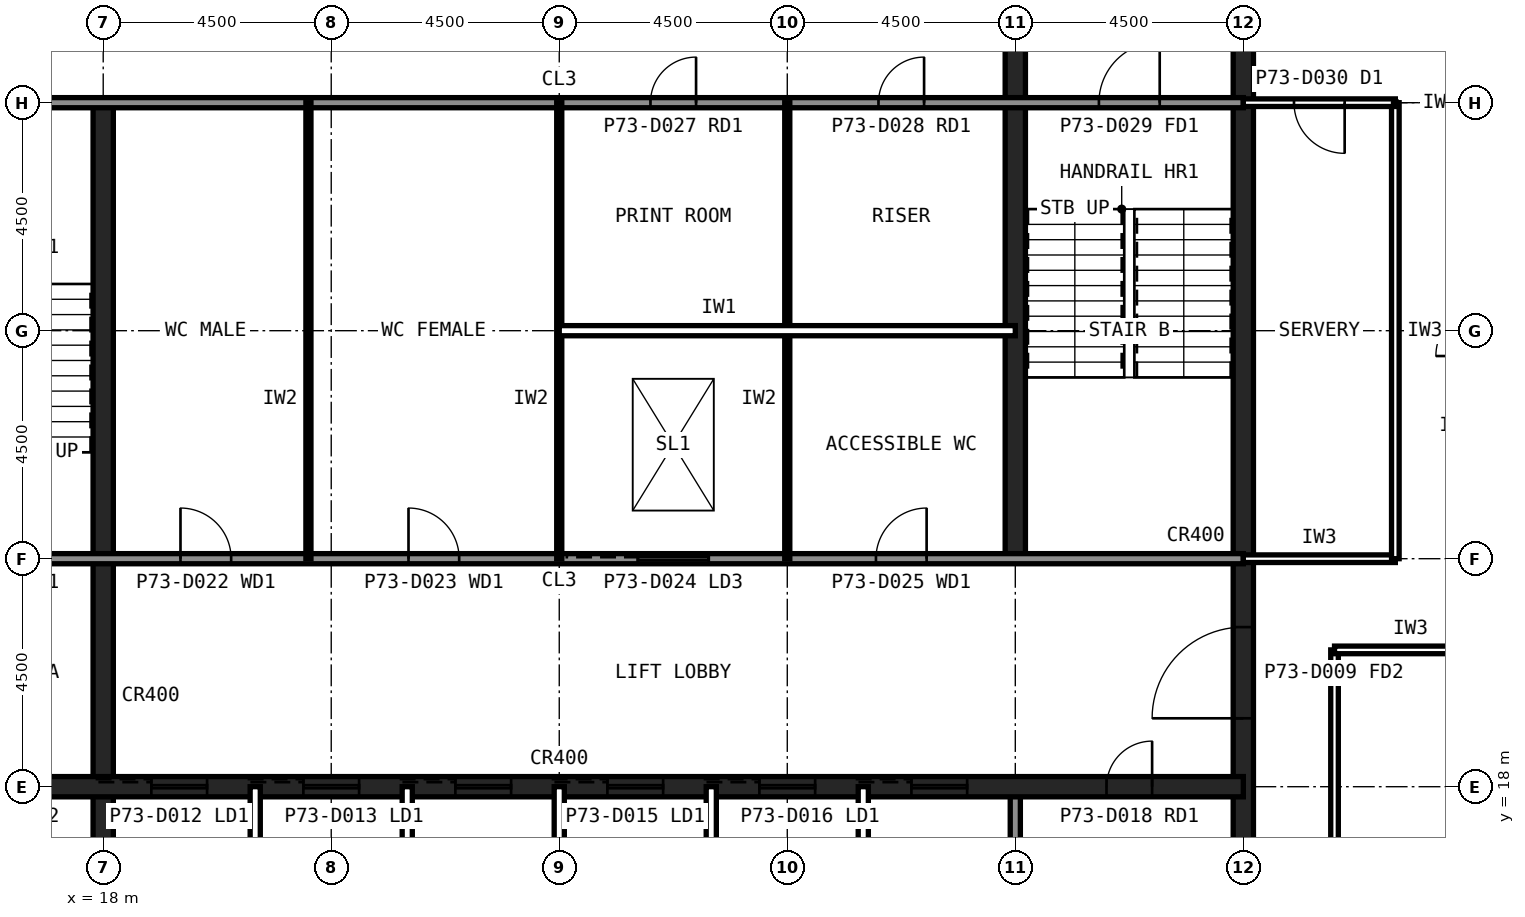
"""IFC4 building model, lengths in metres.
Left out: names, types, materials, properties, quantities, classifications, styles, units other than length and angle.
Written with IfcOpenShell. Run it as: python <this file> out.ifc"""

import sys

from ifc_helpers import new_model, si_unit, direction, frame, frame_2d, origin, place, context, subcontext, project, spatial, rectangle, extrude, element, fill, save


model = new_model("IFC4")
c1 = context("Model", 3, precision=1e-05, world=origin(), true_north=direction((0.0, 1.0)))
c2 = subcontext(c1, "Body", "Model", "MODEL_VIEW")
j1 = project(units=[si_unit("LENGTHUNIT", "METRE"), si_unit("PLANEANGLEUNIT", "RADIAN")], contexts=[c1])
p1 = place(None, origin())
s1 = spatial("IfcSite", under=j1, at=p1, CompositionType="ELEMENT")
p2 = place(p1, origin())
s2 = spatial("IfcBuilding", under=s1, at=p2, CompositionType="ELEMENT")
p3 = place(p2, frame((0.0, 0.0, 302.6)))
s3 = spatial("IfcBuildingStorey", under=s2, at=p3, CompositionType="ELEMENT", Elevation=302.6)
p4 = place(p3, frame((40.5, 13.5, 0.0), z_axis=(0.0, 0.0, 1.0), x_axis=(0.0, 1.0, 0.0)))
e1 = element("IfcWall", 1, at=p4, inside=s3, PredefinedType="SHEAR", context=c2, shape_type="SweptSolid", body=[
    extrude(rectangle(XDim=27.0, YDim=0.4, at=frame_2d((13.5, 0.0))), origin(), (0.0, 0.0, 1.0), 4.0),
])
p5 = place(p4, frame((5.85, 0.0, 0.0)))
e2 = element("IfcOpeningElement", 2, at=p5, cuts=e1, PredefinedType="OPENING", context=c2, shape_type="SweptSolid", body=[
    extrude(rectangle(XDim=1.8, YDim=2.1, at=frame_2d((0.9, 1.05))), frame((0.0, 0.21, 0.0), z_axis=(0.0, -1.0, 0.0), x_axis=(1.0, 0.0, 0.0)), (0.0, 0.0, 1.0), 0.42),
])
p6 = place(p4, frame((19.65, 0.0, 0.0)))
e3 = element("IfcOpeningElement", 3, at=p6, cuts=e1, PredefinedType="OPENING", context=c2, shape_type="SweptSolid", body=[
    extrude(rectangle(XDim=1.2, YDim=2.1, at=frame_2d((0.6, 1.05))), frame((0.0, 0.21, 0.0), z_axis=(0.0, -1.0, 0.0), x_axis=(1.0, 0.0, 0.0)), (0.0, 0.0, 1.0), 0.42),
])
p7 = place(p3, frame((18.0, 13.5, 0.0), z_axis=(0.0, 0.0, 1.0), x_axis=(0.0, 1.0, 0.0)))
e4 = element("IfcWall", 4, at=p7, inside=s3, PredefinedType="SHEAR", context=c2, shape_type="SweptSolid", body=[
    extrude(rectangle(XDim=18.0, YDim=0.4, at=frame_2d((9.0, 0.0))), origin(), (0.0, 0.0, 1.0), 4.0),
])
p8 = place(p3, frame((36.0, 13.5, 0.0), z_axis=(0.0, 0.0, 1.0), x_axis=(0.0, 1.0, 0.0)))
e5 = element("IfcWall", 5, at=p8, inside=s3, PredefinedType="SOLIDWALL", context=c2, shape_type="SweptSolid", body=[
    extrude(rectangle(XDim=4.5, YDim=0.2, at=frame_2d((2.25, 0.0))), origin(), (0.0, 0.0, 1.0), 3.84),
])
p9 = place(p3, frame((36.0, 22.5, 0.0), z_axis=(0.0, 0.0, 1.0), x_axis=(0.0, 1.0, 0.0)))
e6 = element("IfcWall", 6, at=p9, inside=s3, PredefinedType="SHEAR", context=c2, shape_type="SweptSolid", body=[
    extrude(rectangle(XDim=18.0, YDim=0.4, at=frame_2d((9.0, 0.0))), origin(), (0.0, 0.0, 1.0), 4.0),
])
p10 = place(p3, frame((13.5, 18.0, 0.0), z_axis=(0.0, 0.0, 1.0), x_axis=(1.0, 0.0, 0.0)))
e7 = element("IfcWall", 7, at=p10, inside=s3, PredefinedType="SHEAR", context=c2, shape_type="SweptSolid", body=[
    extrude(rectangle(XDim=27.0, YDim=0.4, at=frame_2d((13.5, 0.0))), origin(), (0.0, 0.0, 1.0), 4.0),
])
p11 = place(p10, frame((24.3, 0.0, 0.0)))
e8 = element("IfcOpeningElement", 8, at=p11, cuts=e7, PredefinedType="OPENING", context=c2, shape_type="SweptSolid", body=[
    extrude(rectangle(XDim=0.9, YDim=2.1, at=frame_2d((0.45, 1.05))), frame((0.0, 0.21, 0.0), z_axis=(0.0, -1.0, 0.0), x_axis=(1.0, 0.0, 0.0)), (0.0, 0.0, 1.0), 0.42),
])
p12 = place(p10, frame((5.45, 0.0, 0.0)))
e9 = element("IfcOpeningElement", 9, at=p12, cuts=e7, PredefinedType="OPENING", context=c2, shape_type="SweptSolid", body=[
    extrude(rectangle(XDim=1.1, YDim=2.1, at=frame_2d((0.55, 1.05))), frame((0.0, 0.21, 0.0), z_axis=(0.0, -1.0, 0.0), x_axis=(1.0, 0.0, 0.0)), (0.0, 0.0, 1.0), 0.42),
])
p13 = place(p10, frame((8.45, 0.0, 0.0)))
e10 = element("IfcOpeningElement", 10, at=p13, cuts=e7, PredefinedType="OPENING", context=c2, shape_type="SweptSolid", body=[
    extrude(rectangle(XDim=1.1, YDim=2.1, at=frame_2d((0.55, 1.05))), frame((0.0, 0.21, 0.0), z_axis=(0.0, -1.0, 0.0), x_axis=(1.0, 0.0, 0.0)), (0.0, 0.0, 1.0), 0.42),
])
p14 = place(p10, frame((11.45, 0.0, 0.0)))
e11 = element("IfcOpeningElement", 11, at=p14, cuts=e7, PredefinedType="OPENING", context=c2, shape_type="SweptSolid", body=[
    extrude(rectangle(XDim=1.1, YDim=2.1, at=frame_2d((0.55, 1.05))), frame((0.0, 0.21, 0.0), z_axis=(0.0, -1.0, 0.0), x_axis=(1.0, 0.0, 0.0)), (0.0, 0.0, 1.0), 0.42),
])
p15 = place(p10, frame((14.45, 0.0, 0.0)))
e12 = element("IfcOpeningElement", 12, at=p15, cuts=e7, PredefinedType="OPENING", context=c2, shape_type="SweptSolid", body=[
    extrude(rectangle(XDim=1.1, YDim=2.1, at=frame_2d((0.55, 1.05))), frame((0.0, 0.21, 0.0), z_axis=(0.0, -1.0, 0.0), x_axis=(1.0, 0.0, 0.0)), (0.0, 0.0, 1.0), 0.42),
])
p16 = place(p10, frame((17.45, 0.0, 0.0)))
e13 = element("IfcOpeningElement", 13, at=p16, cuts=e7, PredefinedType="OPENING", context=c2, shape_type="SweptSolid", body=[
    extrude(rectangle(XDim=1.1, YDim=2.1, at=frame_2d((0.55, 1.05))), frame((0.0, 0.21, 0.0), z_axis=(0.0, -1.0, 0.0), x_axis=(1.0, 0.0, 0.0)), (0.0, 0.0, 1.0), 0.42),
])
p17 = place(p10, frame((20.45, 0.0, 0.0)))
e14 = element("IfcOpeningElement", 14, at=p17, cuts=e7, PredefinedType="OPENING", context=c2, shape_type="SweptSolid", body=[
    extrude(rectangle(XDim=1.1, YDim=2.1, at=frame_2d((0.55, 1.05))), frame((0.0, 0.21, 0.0), z_axis=(0.0, -1.0, 0.0), x_axis=(1.0, 0.0, 0.0)), (0.0, 0.0, 1.0), 0.42),
])
p18 = place(p10, frame((1.6, 0.0, 0.0)))
e15 = element("IfcOpeningElement", 15, at=p18, cuts=e7, PredefinedType="OPENING", context=c2, shape_type="SweptSolid", body=[
    extrude(rectangle(XDim=1.3, YDim=2.2, at=frame_2d((0.65, 1.1))), frame((0.0, 0.21, 0.0), z_axis=(0.0, -1.0, 0.0), x_axis=(1.0, 0.0, 0.0)), (0.0, 0.0, 1.0), 0.42),
])
p19 = place(p3, frame((13.5, 22.5, 0.0), z_axis=(0.0, 0.0, 1.0), x_axis=(1.0, 0.0, 0.0)))
e16 = element("IfcWall", 16, at=p19, inside=s3, PredefinedType="SOLIDWALL", context=c2, shape_type="SweptSolid", body=[
    extrude(rectangle(XDim=27.0, YDim=0.2, at=frame_2d((13.5, 0.0))), origin(), (0.0, 0.0, 1.0), 3.84),
])
p20 = place(p19, frame((1.65, 0.0, 0.0)))
e17 = element("IfcOpeningElement", 17, at=p20, cuts=e16, PredefinedType="OPENING", context=c2, shape_type="SweptSolid", body=[
    extrude(rectangle(XDim=1.2, YDim=2.1, at=frame_2d((0.6, 1.05))), frame((0.0, 0.11, 0.0), z_axis=(0.0, -1.0, 0.0), x_axis=(1.0, 0.0, 0.0)), (0.0, 0.0, 1.0), 0.22),
])
p21 = place(p19, frame((6.025, 0.0, 0.0)))
e18 = element("IfcOpeningElement", 18, at=p21, cuts=e16, PredefinedType="OPENING", context=c2, shape_type="SweptSolid", body=[
    extrude(rectangle(XDim=1.0, YDim=2.1, at=frame_2d((0.5, 1.05))), frame((0.0, 0.11, 0.0), z_axis=(0.0, -1.0, 0.0), x_axis=(1.0, 0.0, 0.0)), (0.0, 0.0, 1.0), 0.22),
])
p22 = place(p19, frame((10.525, 0.0, 0.0)))
e19 = element("IfcOpeningElement", 19, at=p22, cuts=e16, PredefinedType="OPENING", context=c2, shape_type="SweptSolid", body=[
    extrude(rectangle(XDim=1.0, YDim=2.1, at=frame_2d((0.5, 1.05))), frame((0.0, 0.11, 0.0), z_axis=(0.0, -1.0, 0.0), x_axis=(1.0, 0.0, 0.0)), (0.0, 0.0, 1.0), 0.22),
])
p23 = place(p19, frame((19.75, 0.0, 0.0)))
e20 = element("IfcOpeningElement", 20, at=p23, cuts=e16, PredefinedType="OPENING", context=c2, shape_type="SweptSolid", body=[
    extrude(rectangle(XDim=1.0, YDim=2.1, at=frame_2d((0.5, 1.05))), frame((0.0, 0.11, 0.0), z_axis=(0.0, -1.0, 0.0), x_axis=(1.0, 0.0, 0.0)), (0.0, 0.0, 1.0), 0.22),
])
p24 = place(p19, frame((15.05, 0.0, 0.0)))
e21 = element("IfcOpeningElement", 21, at=p24, cuts=e16, PredefinedType="OPENING", context=c2, shape_type="SweptSolid", body=[
    extrude(rectangle(XDim=1.4, YDim=2.4, at=frame_2d((0.7, 1.2))), frame((0.0, 0.11, 0.0), z_axis=(0.0, -1.0, 0.0), x_axis=(1.0, 0.0, 0.0)), (0.0, 0.0, 1.0), 0.22),
])
p25 = place(p3, frame((13.5, 31.5, 0.0), z_axis=(0.0, 0.0, 1.0), x_axis=(1.0, 0.0, 0.0)))
e22 = element("IfcWall", 22, at=p25, inside=s3, PredefinedType="SOLIDWALL", context=c2, shape_type="SweptSolid", body=[
    extrude(rectangle(XDim=27.0, YDim=0.2, at=frame_2d((13.5, 0.0))), origin(), (0.0, 0.0, 1.0), 3.84),
])
p26 = place(p25, frame((24.15, 0.0, 0.0)))
e23 = element("IfcOpeningElement", 23, at=p26, cuts=e22, PredefinedType="OPENING", context=c2, shape_type="SweptSolid", body=[
    extrude(rectangle(XDim=1.2, YDim=2.1, at=frame_2d((0.6, 1.05))), frame((0.0, 0.11, 0.0), z_axis=(0.0, -1.0, 0.0), x_axis=(1.0, 0.0, 0.0)), (0.0, 0.0, 1.0), 0.22),
])
p27 = place(p25, frame((15.3, 0.0, 0.0)))
e24 = element("IfcOpeningElement", 24, at=p27, cuts=e22, PredefinedType="OPENING", context=c2, shape_type="SweptSolid", body=[
    extrude(rectangle(XDim=0.9, YDim=2.1, at=frame_2d((0.45, 1.05))), frame((0.0, 0.11, 0.0), z_axis=(0.0, -1.0, 0.0), x_axis=(1.0, 0.0, 0.0)), (0.0, 0.0, 1.0), 0.22),
])
p28 = place(p25, frame((19.8, 0.0, 0.0)))
e25 = element("IfcOpeningElement", 25, at=p28, cuts=e22, PredefinedType="OPENING", context=c2, shape_type="SweptSolid", body=[
    extrude(rectangle(XDim=0.9, YDim=2.1, at=frame_2d((0.45, 1.05))), frame((0.0, 0.11, 0.0), z_axis=(0.0, -1.0, 0.0), x_axis=(1.0, 0.0, 0.0)), (0.0, 0.0, 1.0), 0.22),
])
for number, where, z_axis, x_axis in (
    (26, (21.0, 13.5, 0.0), (0.0, 0.0, 1.0), (0.0, 1.0, 0.0)),
    (27, (24.0, 13.5, 0.0), (0.0, 0.0, 1.0), (0.0, 1.0, 0.0)),
    (28, (27.0, 13.5, 0.0), (0.0, 0.0, 1.0), (0.0, 1.0, 0.0)),
    (29, (30.0, 13.5, 0.0), (0.0, 0.0, 1.0), (0.0, 1.0, 0.0)),
    (30, (33.0, 13.5, 0.0), (0.0, 0.0, 1.0), (0.0, 1.0, 0.0)),
):
    element("IfcWall", number, at=place(p3, frame(where, z_axis=z_axis, x_axis=x_axis)), inside=s3, PredefinedType="PARTITIONING", context=c2, shape_type="SweptSolid", body=[
        extrude(rectangle(XDim=4.5, YDim=0.2, at=frame_2d((2.25, 0.0))), origin(), (0.0, 0.0, 1.0), 3.84),
    ])
for number, where, z_axis, x_axis in (
    (31, (22.05, 22.5, 0.0), (0.0, 0.0, 1.0), (0.0, 1.0, 0.0)),
    (32, (27.0, 22.5, 0.0), (0.0, 0.0, 1.0), (0.0, 1.0, 0.0)),
    (33, (31.5, 22.5, 0.0), (0.0, 0.0, 1.0), (0.0, 1.0, 0.0)),
):
    element("IfcWall", number, at=place(p3, frame(where, z_axis=z_axis, x_axis=x_axis)), inside=s3, PredefinedType="PLUMBINGWALL", context=c2, shape_type="SweptSolid", body=[
        extrude(rectangle(XDim=9.0, YDim=0.1, at=frame_2d((4.5, 0.0))), origin(), (0.0, 0.0, 1.0), 3.84),
    ])
p29 = place(p3, frame((27.0, 27.0, 0.0), z_axis=(0.0, 0.0, 1.0), x_axis=(1.0, 0.0, 0.0)))
e34 = element("IfcWall", 34, at=p29, inside=s3, PredefinedType="PARTITIONING", context=c2, shape_type="SweptSolid", body=[
    extrude(rectangle(XDim=9.0, YDim=0.2, at=frame_2d((4.5, 0.0))), origin(), (0.0, 0.0, 1.0), 3.84),
])
p30 = place(p3, frame((42.3, 11.7, 0.0), z_axis=(0.0, 0.0, 1.0), x_axis=(0.0, 1.0, 0.0)))
e35 = element("IfcWall", 35, at=p30, inside=s3, PredefinedType="PARTITIONING", context=c2, shape_type="SweptSolid", body=[
    extrude(rectangle(XDim=9.0, YDim=0.15, at=frame_2d((4.5, 0.0))), origin(), (0.0, 0.0, 1.0), 3.84),
])
p31 = place(p3, frame((42.3, 20.7, 0.0), z_axis=(0.0, 0.0, 1.0), x_axis=(1.0, 0.0, 0.0)))
e36 = element("IfcWall", 36, at=p31, inside=s3, PredefinedType="PARTITIONING", context=c2, shape_type="SweptSolid", body=[
    extrude(rectangle(XDim=3.0, YDim=0.15, at=frame_2d((1.5, 0.0))), origin(), (0.0, 0.0, 1.0), 3.84),
])
p32 = place(p3, frame((40.5, 22.5, 0.0), z_axis=(0.0, 0.0, 1.0), x_axis=(1.0, 0.0, 0.0)))
e37 = element("IfcWall", 37, at=p32, inside=s3, PredefinedType="PARTITIONING", context=c2, shape_type="SweptSolid", body=[
    extrude(rectangle(XDim=3.0, YDim=0.15, at=frame_2d((1.5, 0.0))), origin(), (0.0, 0.0, 1.0), 2.989),
])
p33 = place(p3, frame((43.5, 22.5, 0.0), z_axis=(0.0, 0.0, 1.0), x_axis=(0.0, 1.0, 0.0)))
e38 = element("IfcWall", 38, at=p33, inside=s3, PredefinedType="PARTITIONING", context=c2, shape_type="SweptSolid", body=[
    extrude(rectangle(XDim=9.0, YDim=0.15, at=frame_2d((4.5, 0.0))), origin(), (0.0, 0.0, 1.0), 3.84),
])
p34 = place(p3, frame((43.5, 31.5, 0.0), z_axis=(0.0, 0.0, 1.0), x_axis=(-1.0, 0.0, 0.0)))
e39 = element("IfcWall", 39, at=p34, inside=s3, PredefinedType="PARTITIONING", context=c2, shape_type="SweptSolid", body=[
    extrude(rectangle(XDim=3.0, YDim=0.15, at=frame_2d((1.5, 0.0))), origin(), (0.0, 0.0, 1.0), 2.989),
])
p35 = place(p34, frame((1.0, 0.0, 0.0)))
e40 = element("IfcOpeningElement", 40, at=p35, cuts=e39, PredefinedType="OPENING", context=c2, shape_type="SweptSolid", body=[
    extrude(rectangle(XDim=1.0, YDim=2.1, at=frame_2d((0.5, 1.05))), frame((0.0, 0.085, 0.0), z_axis=(0.0, -1.0, 0.0), x_axis=(1.0, 0.0, 0.0)), (0.0, 0.0, 1.0), 0.17),
])
p36 = place(p5, origin())
e41 = element("IfcDoor", 41, at=p36, inside=s3, OperationType="SINGLE_SWING_LEFT", PredefinedType="DOOR", context=c2, shape_type="SweptSolid", body=[
    extrude(rectangle(XDim=1.8, YDim=2.1, at=frame_2d((0.9, 1.05))), frame((0.0, 0.025, 0.0), z_axis=(0.0, -1.0, 0.0), x_axis=(1.0, 0.0, 0.0)), (0.0, 0.0, 1.0), 0.05),
])
fill(e2, e41)
p37 = place(p26, origin())
e42 = element("IfcDoor", 42, at=p37, inside=s3, OperationType="SINGLE_SWING_RIGHT", PredefinedType="DOOR", context=c2, shape_type="SweptSolid", body=[
    extrude(rectangle(XDim=1.2, YDim=2.1, at=frame_2d((0.6, 1.05))), frame((0.0, 0.025, 0.0), z_axis=(0.0, -1.0, 0.0), x_axis=(1.0, 0.0, 0.0)), (0.0, 0.0, 1.0), 0.05),
])
fill(e23, e42)
p38 = place(p21, origin())
e43 = element("IfcDoor", 43, at=p38, inside=s3, OperationType="SINGLE_SWING_LEFT", PredefinedType="DOOR", context=c2, shape_type="SweptSolid", body=[
    extrude(rectangle(XDim=1.0, YDim=2.1, at=frame_2d((0.5, 1.05))), frame((0.0, 0.025, 0.0), z_axis=(0.0, -1.0, 0.0), x_axis=(1.0, 0.0, 0.0)), (0.0, 0.0, 1.0), 0.05),
])
fill(e18, e43)
p39 = place(p22, origin())
e44 = element("IfcDoor", 44, at=p39, inside=s3, OperationType="SINGLE_SWING_LEFT", PredefinedType="DOOR", context=c2, shape_type="SweptSolid", body=[
    extrude(rectangle(XDim=1.0, YDim=2.1, at=frame_2d((0.5, 1.05))), frame((0.0, 0.025, 0.0), z_axis=(0.0, -1.0, 0.0), x_axis=(1.0, 0.0, 0.0)), (0.0, 0.0, 1.0), 0.05),
])
fill(e19, e44)
p40 = place(p23, origin())
e45 = element("IfcDoor", 45, at=p40, inside=s3, OperationType="SINGLE_SWING_RIGHT", PredefinedType="DOOR", context=c2, shape_type="SweptSolid", body=[
    extrude(rectangle(XDim=1.0, YDim=2.1, at=frame_2d((0.5, 1.05))), frame((0.0, 0.025, 0.0), z_axis=(0.0, -1.0, 0.0), x_axis=(1.0, 0.0, 0.0)), (0.0, 0.0, 1.0), 0.05),
])
fill(e20, e45)
p41 = place(p27, origin())
e46 = element("IfcDoor", 46, at=p41, inside=s3, OperationType="SINGLE_SWING_RIGHT", PredefinedType="DOOR", context=c2, shape_type="SweptSolid", body=[
    extrude(rectangle(XDim=0.9, YDim=2.1, at=frame_2d((0.45, 1.05))), frame((0.0, 0.025, 0.0), z_axis=(0.0, -1.0, 0.0), x_axis=(1.0, 0.0, 0.0)), (0.0, 0.0, 1.0), 0.05),
])
fill(e24, e46)
p42 = place(p28, origin())
e47 = element("IfcDoor", 47, at=p42, inside=s3, OperationType="SINGLE_SWING_RIGHT", PredefinedType="DOOR", context=c2, shape_type="SweptSolid", body=[
    extrude(rectangle(XDim=0.9, YDim=2.1, at=frame_2d((0.45, 1.05))), frame((0.0, 0.025, 0.0), z_axis=(0.0, -1.0, 0.0), x_axis=(1.0, 0.0, 0.0)), (0.0, 0.0, 1.0), 0.05),
])
fill(e25, e47)
p43 = place(p11, origin())
e48 = element("IfcDoor", 48, at=p43, inside=s3, OperationType="SINGLE_SWING_RIGHT", PredefinedType="DOOR", context=c2, shape_type="SweptSolid", body=[
    extrude(rectangle(XDim=0.9, YDim=2.1, at=frame_2d((0.45, 1.05))), frame((0.0, 0.025, 0.0), z_axis=(0.0, -1.0, 0.0), x_axis=(1.0, 0.0, 0.0)), (0.0, 0.0, 1.0), 0.05),
])
fill(e8, e48)
p44 = place(p12, origin())
e49 = element("IfcDoor", 49, at=p44, inside=s3, OperationType="SLIDING_TO_LEFT", PredefinedType="DOOR", context=c2, shape_type="SweptSolid", body=[
    extrude(rectangle(XDim=1.1, YDim=2.1, at=frame_2d((0.55, 1.05))), frame((0.0, 0.025, 0.0), z_axis=(0.0, -1.0, 0.0), x_axis=(1.0, 0.0, 0.0)), (0.0, 0.0, 1.0), 0.05),
])
fill(e9, e49)
p45 = place(p13, origin())
e50 = element("IfcDoor", 50, at=p45, inside=s3, OperationType="SLIDING_TO_LEFT", PredefinedType="DOOR", context=c2, shape_type="SweptSolid", body=[
    extrude(rectangle(XDim=1.1, YDim=2.1, at=frame_2d((0.55, 1.05))), frame((0.0, 0.025, 0.0), z_axis=(0.0, -1.0, 0.0), x_axis=(1.0, 0.0, 0.0)), (0.0, 0.0, 1.0), 0.05),
])
fill(e10, e50)
p46 = place(p14, origin())
e51 = element("IfcDoor", 51, at=p46, inside=s3, OperationType="SLIDING_TO_LEFT", PredefinedType="DOOR", context=c2, shape_type="SweptSolid", body=[
    extrude(rectangle(XDim=1.1, YDim=2.1, at=frame_2d((0.55, 1.05))), frame((0.0, 0.025, 0.0), z_axis=(0.0, -1.0, 0.0), x_axis=(1.0, 0.0, 0.0)), (0.0, 0.0, 1.0), 0.05),
])
fill(e11, e51)
p47 = place(p15, origin())
e52 = element("IfcDoor", 52, at=p47, inside=s3, OperationType="SLIDING_TO_LEFT", PredefinedType="DOOR", context=c2, shape_type="SweptSolid", body=[
    extrude(rectangle(XDim=1.1, YDim=2.1, at=frame_2d((0.55, 1.05))), frame((0.0, 0.025, 0.0), z_axis=(0.0, -1.0, 0.0), x_axis=(1.0, 0.0, 0.0)), (0.0, 0.0, 1.0), 0.05),
])
fill(e12, e52)
p48 = place(p16, origin())
e53 = element("IfcDoor", 53, at=p48, inside=s3, OperationType="SLIDING_TO_LEFT", PredefinedType="DOOR", context=c2, shape_type="SweptSolid", body=[
    extrude(rectangle(XDim=1.1, YDim=2.1, at=frame_2d((0.55, 1.05))), frame((0.0, 0.025, 0.0), z_axis=(0.0, -1.0, 0.0), x_axis=(1.0, 0.0, 0.0)), (0.0, 0.0, 1.0), 0.05),
])
fill(e13, e53)
p49 = place(p17, origin())
e54 = element("IfcDoor", 54, at=p49, inside=s3, OperationType="SLIDING_TO_LEFT", PredefinedType="DOOR", context=c2, shape_type="SweptSolid", body=[
    extrude(rectangle(XDim=1.1, YDim=2.1, at=frame_2d((0.55, 1.05))), frame((0.0, 0.025, 0.0), z_axis=(0.0, -1.0, 0.0), x_axis=(1.0, 0.0, 0.0)), (0.0, 0.0, 1.0), 0.05),
])
fill(e14, e54)
p50 = place(p24, origin())
e55 = element("IfcDoor", 55, at=p50, inside=s3, OperationType="SLIDING_TO_LEFT", PredefinedType="DOOR", context=c2, shape_type="SweptSolid", body=[
    extrude(rectangle(XDim=1.4, YDim=2.4, at=frame_2d((0.7, 1.2))), frame((0.0, 0.025, 0.0), z_axis=(0.0, -1.0, 0.0), x_axis=(1.0, 0.0, 0.0)), (0.0, 0.0, 1.0), 0.05),
])
fill(e21, e55)
p51 = place(p35, origin())
e56 = element("IfcDoor", 56, at=p51, inside=s3, OperationType="SINGLE_SWING_LEFT", PredefinedType="DOOR", context=c2, shape_type="SweptSolid", body=[
    extrude(rectangle(XDim=1.0, YDim=2.1, at=frame_2d((0.5, 1.05))), frame((0.0, 0.025, 0.0), z_axis=(0.0, -1.0, 0.0), x_axis=(1.0, 0.0, 0.0)), (0.0, 0.0, 1.0), 0.05),
])
fill(e40, e56)
save(model, sys.argv[1])
